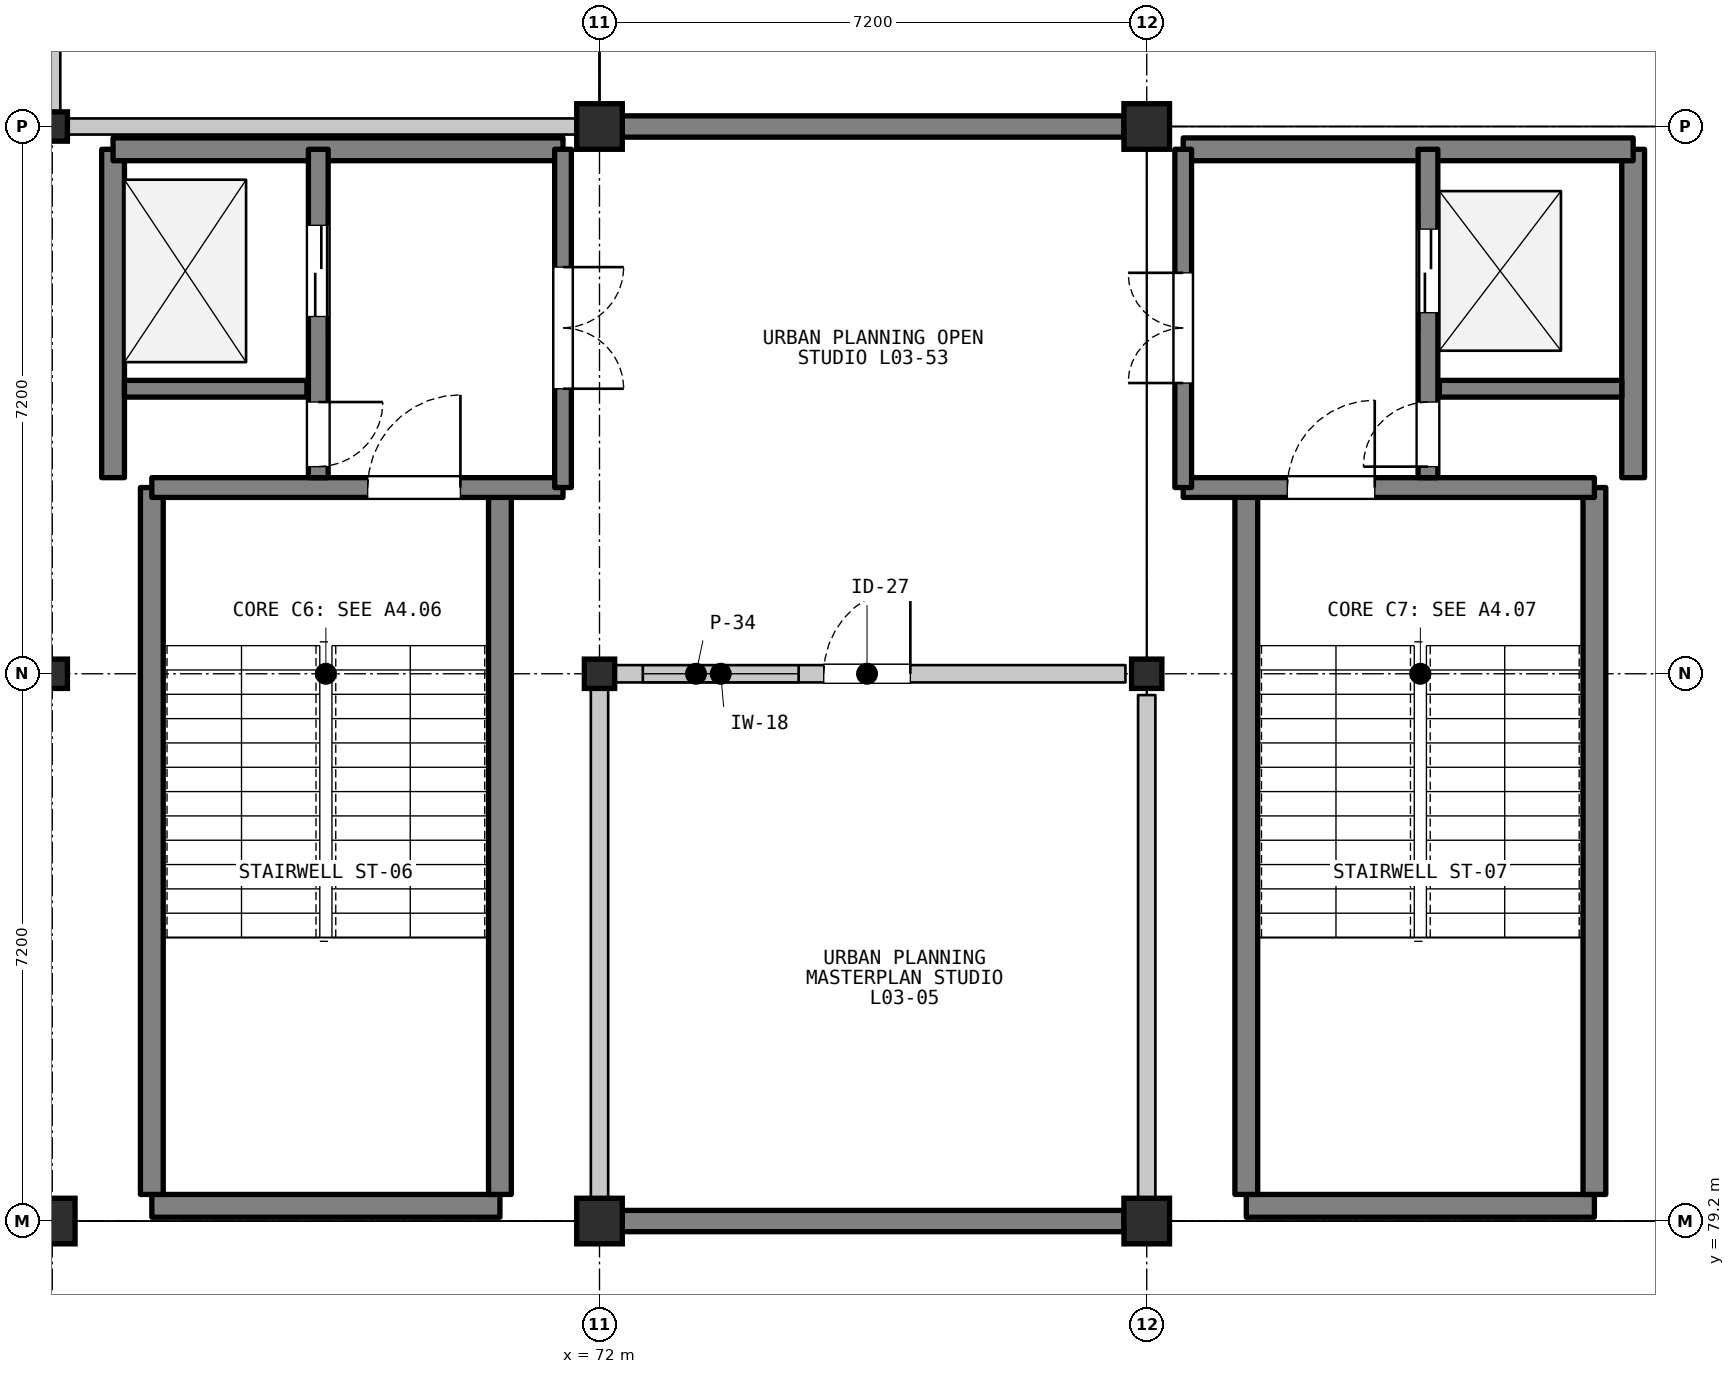
"""IFC4 building model, lengths in metres.
Left out: names, types, materials, properties, quantities, classifications, styles, units other than length and angle.
Written with IfcOpenShell. Run it as: python <this file> out.ifc"""

import sys

from ifc_helpers import new_model, si_unit, direction, frame, frame_2d, origin, origin_2d, place, context, subcontext, project, spatial, rectangle, i_section, extrude, element, fill, save


model = new_model("IFC4")
c1 = context("Model", 3, precision=1e-05, world=origin(), true_north=direction((0.0, 1.0)))
c2 = subcontext(c1, "Body", "Model", "MODEL_VIEW")
j1 = project(units=[si_unit("LENGTHUNIT", "METRE"), si_unit("PLANEANGLEUNIT", "RADIAN")], contexts=[c1])
p1 = place(None, origin())
s1 = spatial("IfcSite", under=j1, at=p1, CompositionType="ELEMENT")
p2 = place(p1, origin())
s2 = spatial("IfcBuilding", under=s1, at=p2, CompositionType="ELEMENT")
p3 = place(p2, frame((0.0, 0.0, 9.9)))
s3 = spatial("IfcBuildingStorey", under=s2, at=p3, CompositionType="ELEMENT", Elevation=9.9)
p4 = place(p3, frame((64.8, 79.2, 0.0), z_axis=(0.0, 0.0, 1.0), x_axis=(1.0, 0.0, 0.0)))
e1 = element("IfcColumn", 1, at=p4, inside=s3, PredefinedType="COLUMN", context=c2, shape_type="SweptSolid", body=[
    extrude(rectangle(XDim=0.6, YDim=0.6, at=origin_2d()), origin(), (0.0, 0.0, 1.0), 4.2),
])
for number, where, z_axis, x_axis in (
    (2, (64.8, 86.4, 0.0), (0.0, 0.0, 1.0), (1.0, 0.0, 0.0)),
    (3, (64.8, 93.6, 0.0), (0.0, 0.0, 1.0), (1.0, 0.0, 0.0)),
):
    element("IfcColumn", number, at=place(p3, frame(where, z_axis=z_axis, x_axis=x_axis)), inside=s3, PredefinedType="COLUMN", context=c2, shape_type="SweptSolid", body=[
        extrude(i_section(OverallWidth=0.399, OverallDepth=0.386, WebThickness=0.021, FlangeThickness=0.033, FilletRadius=0.015, at=origin_2d()), origin(), (0.0, 0.0, 1.0), 4.2),
    ])
p5 = place(p3, frame((72.0, 79.2, 0.0), z_axis=(0.0, 0.0, 1.0), x_axis=(1.0, 0.0, 0.0)))
e4 = element("IfcColumn", 4, at=p5, inside=s3, PredefinedType="COLUMN", context=c2, shape_type="SweptSolid", body=[
    extrude(rectangle(XDim=0.6, YDim=0.6, at=origin_2d()), origin(), (0.0, 0.0, 1.0), 4.2),
])
p6 = place(p3, frame((72.0, 86.4, 0.0), z_axis=(0.0, 0.0, 1.0), x_axis=(1.0, 0.0, 0.0)))
e5 = element("IfcColumn", 5, at=p6, inside=s3, PredefinedType="COLUMN", context=c2, shape_type="SweptSolid", body=[
    extrude(i_section(OverallWidth=0.399, OverallDepth=0.386, WebThickness=0.021, FlangeThickness=0.033, FilletRadius=0.015, at=origin_2d()), origin(), (0.0, 0.0, 1.0), 4.2),
])
for number, where, z_axis, x_axis in (
    (6, (72.0, 93.6, 0.0), (0.0, 0.0, 1.0), (1.0, 0.0, 0.0)),
    (7, (79.2, 79.2, 0.0), (0.0, 0.0, 1.0), (1.0, 0.0, 0.0)),
):
    element("IfcColumn", number, at=place(p3, frame(where, z_axis=z_axis, x_axis=x_axis)), inside=s3, PredefinedType="COLUMN", context=c2, shape_type="SweptSolid", body=[
        extrude(rectangle(XDim=0.6, YDim=0.6, at=origin_2d()), origin(), (0.0, 0.0, 1.0), 4.2),
    ])
p7 = place(p3, frame((79.2, 86.4, 0.0), z_axis=(0.0, 0.0, 1.0), x_axis=(1.0, 0.0, 0.0)))
e8 = element("IfcColumn", 8, at=p7, inside=s3, PredefinedType="COLUMN", context=c2, shape_type="SweptSolid", body=[
    extrude(i_section(OverallWidth=0.399, OverallDepth=0.386, WebThickness=0.021, FlangeThickness=0.033, FilletRadius=0.015, at=origin_2d()), origin(), (0.0, 0.0, 1.0), 4.2),
])
p8 = place(p3, frame((79.2, 93.6, 0.0), z_axis=(0.0, 0.0, 1.0), x_axis=(1.0, 0.0, 0.0)))
e9 = element("IfcColumn", 9, at=p8, inside=s3, PredefinedType="COLUMN", context=c2, shape_type="SweptSolid", body=[
    extrude(rectangle(XDim=0.6, YDim=0.6, at=origin_2d()), origin(), (0.0, 0.0, 1.0), 4.2),
])
for number, where, z_axis, x_axis in (
    (10, (78.9, 79.2, 0.0), (0.0, 0.0, 1.0), (-1.0, 0.0, 0.0)),
    (11, (72.3, 93.6, 0.0), (0.0, 0.0, 1.0), (1.0, 0.0, 0.0)),
):
    element("IfcWall", number, at=place(p3, frame(where, z_axis=z_axis, x_axis=x_axis)), inside=s3, PredefinedType="SOLIDWALL", context=c2, shape_type="SweptSolid", body=[
        extrude(rectangle(XDim=6.6, YDim=0.28, at=frame_2d((3.3, 0.0))), origin(), (0.0, 0.0, 1.0), 3.418),
    ])
p9 = place(p3, frame((66.11, 79.4, 0.0), z_axis=(0.0, 0.0, 1.0), x_axis=(1.0, 0.0, 0.0)))
e12 = element("IfcWall", 12, at=p9, inside=s3, PredefinedType="SHEAR", context=c2, shape_type="SweptSolid", body=[
    extrude(rectangle(XDim=4.58, YDim=0.3, at=frame_2d((2.29, 0.0))), origin(), (0.0, 0.0, 1.0), 4.02),
])
for number, where, z_axis, x_axis in (
    (13, (66.11, 79.55, 0.0), (0.0, 0.0, 1.0), (0.0, 1.0, 0.0)),
    (14, (70.69, 79.55, 0.0), (0.0, 0.0, 1.0), (0.0, 1.0, 0.0)),
):
    element("IfcWall", number, at=place(p3, frame(where, z_axis=z_axis, x_axis=x_axis)), inside=s3, PredefinedType="SHEAR", context=c2, shape_type="SweptSolid", body=[
        extrude(rectangle(XDim=9.3, YDim=0.3, at=frame_2d((4.65, 0.0))), origin(), (0.0, 0.0, 1.0), 4.02),
    ])
p10 = place(p3, frame((66.11, 88.85, 0.0), z_axis=(0.0, 0.0, 1.0), x_axis=(1.0, 0.0, 0.0)))
e15 = element("IfcWall", 15, at=p10, inside=s3, PredefinedType="SHEAR", context=c2, shape_type="SweptSolid", body=[
    extrude(rectangle(XDim=5.41, YDim=0.26, at=frame_2d((2.705, 0.0))), origin(), (0.0, 0.0, 1.0), 4.02),
])
p11 = place(p10, frame((2.84, 0.0, 0.0)))
e16 = element("IfcOpeningElement", 16, at=p11, cuts=e15, PredefinedType="OPENING", context=c2, shape_type="SweptSolid", body=[
    extrude(rectangle(XDim=1.22, YDim=2.15, at=frame_2d((0.61, 1.075))), frame((0.0, 0.14, 0.0), z_axis=(0.0, -1.0, 0.0), x_axis=(1.0, 0.0, 0.0)), (0.0, 0.0, 1.0), 0.28),
])
p12 = place(p3, frame((65.6, 88.98, 0.0), z_axis=(0.0, 0.0, 1.0), x_axis=(0.0, 1.0, 0.0)))
e17 = element("IfcWall", 17, at=p12, inside=s3, PredefinedType="SHEAR", context=c2, shape_type="SweptSolid", body=[
    extrude(rectangle(XDim=4.32, YDim=0.3, at=frame_2d((2.16, 0.0))), origin(), (0.0, 0.0, 1.0), 4.02),
])
p13 = place(p3, frame((65.6, 93.3, 0.0), z_axis=(0.0, 0.0, 1.0), x_axis=(1.0, 0.0, 0.0)))
e18 = element("IfcWall", 18, at=p13, inside=s3, PredefinedType="SHEAR", context=c2, shape_type="SweptSolid", body=[
    extrude(rectangle(XDim=5.92, YDim=0.3, at=frame_2d((2.96, 0.0))), origin(), (0.0, 0.0, 1.0), 4.02),
])
p14 = place(p3, frame((65.75, 90.15, 0.0), z_axis=(0.0, 0.0, 1.0), x_axis=(1.0, 0.0, 0.0)))
e19 = element("IfcWall", 19, at=p14, inside=s3, PredefinedType="SHEAR", context=c2, shape_type="SweptSolid", body=[
    extrude(rectangle(XDim=2.4, YDim=0.22, at=frame_2d((1.2, 0.0))), origin(), (0.0, 0.0, 1.0), 4.02),
])
p15 = place(p3, frame((68.3, 93.3, 0.0), z_axis=(0.0, 0.0, 1.0), x_axis=(0.0, -1.0, 0.0)))
e20 = element("IfcWall", 20, at=p15, inside=s3, PredefinedType="SHEAR", context=c2, shape_type="SweptSolid", body=[
    extrude(rectangle(XDim=4.32, YDim=0.26, at=frame_2d((2.16, 0.0))), origin(), (0.0, 0.0, 1.0), 4.02),
])
p16 = place(p15, frame((1.0, 0.0, 0.0)))
e21 = element("IfcOpeningElement", 21, at=p16, cuts=e20, PredefinedType="OPENING", context=c2, shape_type="SweptSolid", body=[
    extrude(rectangle(XDim=1.2, YDim=2.15, at=frame_2d((0.6, 1.075))), frame((0.0, 0.14, 0.0), z_axis=(0.0, -1.0, 0.0), x_axis=(1.0, 0.0, 0.0)), (0.0, 0.0, 1.0), 0.28),
])
p17 = place(p15, frame((3.325, 0.0, 0.0)))
e22 = element("IfcOpeningElement", 22, at=p17, cuts=e20, PredefinedType="OPENING", context=c2, shape_type="SweptSolid", body=[
    extrude(rectangle(XDim=0.85, YDim=2.05, at=frame_2d((0.425, 1.025))), frame((0.0, 0.14, 0.0), z_axis=(0.0, -1.0, 0.0), x_axis=(1.0, 0.0, 0.0)), (0.0, 0.0, 1.0), 0.28),
])
p18 = place(p3, frame((71.52, 93.3, 0.0), z_axis=(0.0, 0.0, 1.0), x_axis=(0.0, -1.0, 0.0)))
e23 = element("IfcWall", 23, at=p18, inside=s3, PredefinedType="SHEAR", context=c2, shape_type="SweptSolid", body=[
    extrude(rectangle(XDim=4.45, YDim=0.22, at=frame_2d((2.225, 0.0))), origin(), (0.0, 0.0, 1.0), 4.02),
])
p19 = place(p18, frame((1.55, 0.0, 0.0)))
e24 = element("IfcOpeningElement", 24, at=p19, cuts=e23, PredefinedType="OPENING", context=c2, shape_type="SweptSolid", body=[
    extrude(rectangle(XDim=1.6, YDim=2.2, at=frame_2d((0.8, 1.1))), frame((0.0, 0.12, 0.0), z_axis=(0.0, -1.0, 0.0), x_axis=(1.0, 0.0, 0.0)), (0.0, 0.0, 1.0), 0.24),
])
p20 = place(p3, frame((80.51, 79.4, 0.0), z_axis=(0.0, 0.0, 1.0), x_axis=(1.0, 0.0, 0.0)))
e25 = element("IfcWall", 25, at=p20, inside=s3, PredefinedType="SHEAR", context=c2, shape_type="SweptSolid", body=[
    extrude(rectangle(XDim=4.58, YDim=0.3, at=frame_2d((2.29, 0.0))), origin(), (0.0, 0.0, 1.0), 4.02),
])
for number, where, z_axis, x_axis in (
    (26, (80.51, 79.55, 0.0), (0.0, 0.0, 1.0), (0.0, 1.0, 0.0)),
    (27, (85.09, 79.55, 0.0), (0.0, 0.0, 1.0), (0.0, 1.0, 0.0)),
):
    element("IfcWall", number, at=place(p3, frame(where, z_axis=z_axis, x_axis=x_axis)), inside=s3, PredefinedType="SHEAR", context=c2, shape_type="SweptSolid", body=[
        extrude(rectangle(XDim=9.3, YDim=0.3, at=frame_2d((4.65, 0.0))), origin(), (0.0, 0.0, 1.0), 4.02),
    ])
p21 = place(p3, frame((79.68, 88.85, 0.0), z_axis=(0.0, 0.0, 1.0), x_axis=(1.0, 0.0, 0.0)))
e28 = element("IfcWall", 28, at=p21, inside=s3, PredefinedType="SHEAR", context=c2, shape_type="SweptSolid", body=[
    extrude(rectangle(XDim=5.41, YDim=0.26, at=frame_2d((2.705, 0.0))), origin(), (0.0, 0.0, 1.0), 4.02),
])
p22 = place(p21, frame((1.37, 0.0, 0.0)))
e29 = element("IfcOpeningElement", 29, at=p22, cuts=e28, PredefinedType="OPENING", context=c2, shape_type="SweptSolid", body=[
    extrude(rectangle(XDim=1.15, YDim=2.15, at=frame_2d((0.575, 1.075))), frame((0.0, 0.14, 0.0), z_axis=(0.0, -1.0, 0.0), x_axis=(1.0, 0.0, 0.0)), (0.0, 0.0, 1.0), 0.28),
])
p23 = place(p3, frame((85.6, 88.98, 0.0), z_axis=(0.0, 0.0, 1.0), x_axis=(0.0, 1.0, 0.0)))
e30 = element("IfcWall", 30, at=p23, inside=s3, PredefinedType="SHEAR", context=c2, shape_type="SweptSolid", body=[
    extrude(rectangle(XDim=4.32, YDim=0.3, at=frame_2d((2.16, 0.0))), origin(), (0.0, 0.0, 1.0), 4.02),
])
p24 = place(p3, frame((79.68, 93.3, 0.0), z_axis=(0.0, 0.0, 1.0), x_axis=(1.0, 0.0, 0.0)))
e31 = element("IfcWall", 31, at=p24, inside=s3, PredefinedType="SHEAR", context=c2, shape_type="SweptSolid", body=[
    extrude(rectangle(XDim=5.92, YDim=0.3, at=frame_2d((2.96, 0.0))), origin(), (0.0, 0.0, 1.0), 4.02),
])
p25 = place(p3, frame((83.05, 90.15, 0.0), z_axis=(0.0, 0.0, 1.0), x_axis=(1.0, 0.0, 0.0)))
e32 = element("IfcWall", 32, at=p25, inside=s3, PredefinedType="SHEAR", context=c2, shape_type="SweptSolid", body=[
    extrude(rectangle(XDim=2.4, YDim=0.22, at=frame_2d((1.2, 0.0))), origin(), (0.0, 0.0, 1.0), 4.02),
])
p26 = place(p3, frame((82.9, 88.98, 0.0), z_axis=(0.0, 0.0, 1.0), x_axis=(0.0, 1.0, 0.0)))
e33 = element("IfcWall", 33, at=p26, inside=s3, PredefinedType="SHEAR", context=c2, shape_type="SweptSolid", body=[
    extrude(rectangle(XDim=4.32, YDim=0.26, at=frame_2d((2.16, 0.0))), origin(), (0.0, 0.0, 1.0), 4.02),
])
p27 = place(p26, frame((2.17, 0.0, 0.0)))
e34 = element("IfcOpeningElement", 34, at=p27, cuts=e33, PredefinedType="OPENING", context=c2, shape_type="SweptSolid", body=[
    extrude(rectangle(XDim=1.1, YDim=2.15, at=frame_2d((0.55, 1.075))), frame((0.0, 0.14, 0.0), z_axis=(0.0, -1.0, 0.0), x_axis=(1.0, 0.0, 0.0)), (0.0, 0.0, 1.0), 0.28),
])
p28 = place(p26, frame((0.145, 0.0, 0.0)))
e35 = element("IfcOpeningElement", 35, at=p28, cuts=e33, PredefinedType="OPENING", context=c2, shape_type="SweptSolid", body=[
    extrude(rectangle(XDim=0.85, YDim=2.05, at=frame_2d((0.425, 1.025))), frame((0.0, 0.14, 0.0), z_axis=(0.0, -1.0, 0.0), x_axis=(1.0, 0.0, 0.0)), (0.0, 0.0, 1.0), 0.28),
])
p29 = place(p3, frame((79.68, 88.85, 0.0), z_axis=(0.0, 0.0, 1.0), x_axis=(0.0, 1.0, 0.0)))
e36 = element("IfcWall", 36, at=p29, inside=s3, PredefinedType="SHEAR", context=c2, shape_type="SweptSolid", body=[
    extrude(rectangle(XDim=4.45, YDim=0.22, at=frame_2d((2.225, 0.0))), origin(), (0.0, 0.0, 1.0), 4.02),
])
p30 = place(p29, frame((1.375, 0.0, 0.0)))
e37 = element("IfcOpeningElement", 37, at=p30, cuts=e36, PredefinedType="OPENING", context=c2, shape_type="SweptSolid", body=[
    extrude(rectangle(XDim=1.45, YDim=2.2, at=frame_2d((0.725, 1.1))), frame((0.0, 0.12, 0.0), z_axis=(0.0, -1.0, 0.0), x_axis=(1.0, 0.0, 0.0)), (0.0, 0.0, 1.0), 0.24),
])
for number, where, z_axis, x_axis in (
    (38, (71.88, 93.6, 0.0), (0.0, 0.0, 1.0), (-1.0, 0.0, 0.0)),
    (39, (64.8, 93.72, 0.0), (0.0, 0.0, 1.0), (0.0, 1.0, 0.0)),
):
    element("IfcWall", number, at=place(p3, frame(where, z_axis=z_axis, x_axis=x_axis)), inside=s3, PredefinedType="PARTITIONING", context=c2, shape_type="SweptSolid", body=[
        extrude(rectangle(XDim=6.96, YDim=0.212, at=frame_2d((3.48, 0.0))), origin(), (0.0, 0.0, 1.0), 3.408),
    ])
p31 = place(p3, frame((72.12, 86.4, 0.0), z_axis=(0.0, 0.0, 1.0), x_axis=(1.0, 0.0, 0.0)))
e40 = element("IfcWall", 40, at=p31, inside=s3, PredefinedType="PARTITIONING", context=c2, shape_type="SweptSolid", body=[
    extrude(rectangle(XDim=6.8, YDim=0.228, at=frame_2d((3.4, 0.0))), origin(), (0.0, 0.0, 1.0), 3.408),
])
p32 = place(p31, frame((2.83, 0.0, 0.0)))
e41 = element("IfcOpeningElement", 41, at=p32, cuts=e40, PredefinedType="OPENING", context=c2, shape_type="SweptSolid", body=[
    extrude(rectangle(XDim=1.14, YDim=2.18, at=frame_2d((0.57, 1.09))), frame((0.0, 0.124, 0.0), z_axis=(0.0, -1.0, 0.0), x_axis=(1.0, 0.0, 0.0)), (0.0, 0.0, 1.0), 0.248),
])
p33 = place(p31, frame((0.45, 0.0, 1.05)))
e42 = element("IfcOpeningElement", 42, at=p33, cuts=e40, PredefinedType="OPENING", context=c2, shape_type="SweptSolid", body=[
    extrude(rectangle(XDim=2.05, YDim=1.22, at=frame_2d((1.025, 0.61))), frame((0.0, 0.124, 0.0), z_axis=(0.0, -1.0, 0.0), x_axis=(1.0, 0.0, 0.0)), (0.0, 0.0, 1.0), 0.248),
])
p34 = place(p3, frame((72.0, 79.32, 0.0), z_axis=(0.0, 0.0, 1.0), x_axis=(0.0, 1.0, 0.0)))
e43 = element("IfcWall", 43, at=p34, inside=s3, PredefinedType="PARTITIONING", context=c2, shape_type="SweptSolid", body=[
    extrude(rectangle(XDim=6.96, YDim=0.228, at=frame_2d((3.48, 0.0))), origin(), (0.0, 0.0, 1.0), 3.408),
])
p35 = place(p3, frame((79.2, 86.12, 0.0), z_axis=(0.0, 0.0, 1.0), x_axis=(0.0, -1.0, 0.0)))
e44 = element("IfcWall", 44, at=p35, inside=s3, PredefinedType="PARTITIONING", context=c2, shape_type="SweptSolid", body=[
    extrude(rectangle(XDim=6.64, YDim=0.228, at=frame_2d((3.32, 0.0))), origin(), (0.0, 0.0, 1.0), 3.477),
])
p36 = place(p11, origin())
e45 = element("IfcDoor", 45, at=p36, inside=s3, OperationType="SINGLE_SWING_RIGHT", PredefinedType="DOOR", context=c2, shape_type="SweptSolid", body=[
    extrude(rectangle(XDim=1.22, YDim=2.15, at=frame_2d((0.61, 1.075))), frame((0.0, 0.025, 0.0), z_axis=(0.0, -1.0, 0.0), x_axis=(1.0, 0.0, 0.0)), (0.0, 0.0, 1.0), 0.05),
])
fill(e16, e45)
p37 = place(p16, origin())
e46 = element("IfcDoor", 46, at=p37, inside=s3, OperationType="DOUBLE_DOOR_SLIDING", PredefinedType="DOOR", context=c2, shape_type="SweptSolid", body=[
    extrude(rectangle(XDim=1.2, YDim=2.15, at=frame_2d((0.6, 1.075))), frame((0.0, 0.025, 0.0), z_axis=(0.0, -1.0, 0.0), x_axis=(1.0, 0.0, 0.0)), (0.0, 0.0, 1.0), 0.05),
])
fill(e21, e46)
p38 = place(p17, origin())
e47 = element("IfcDoor", 47, at=p38, inside=s3, OperationType="SINGLE_SWING_LEFT", PredefinedType="DOOR", context=c2, shape_type="SweptSolid", body=[
    extrude(rectangle(XDim=0.85, YDim=2.05, at=frame_2d((0.425, 1.025))), frame((0.0, 0.025, 0.0), z_axis=(0.0, -1.0, 0.0), x_axis=(1.0, 0.0, 0.0)), (0.0, 0.0, 1.0), 0.05),
])
fill(e22, e47)
p39 = place(p19, origin())
e48 = element("IfcDoor", 48, at=p39, inside=s3, OperationType="DOUBLE_DOOR_SINGLE_SWING", PredefinedType="DOOR", context=c2, shape_type="SweptSolid", body=[
    extrude(rectangle(XDim=1.6, YDim=2.2, at=frame_2d((0.8, 1.1))), frame((0.0, 0.025, 0.0), z_axis=(0.0, -1.0, 0.0), x_axis=(1.0, 0.0, 0.0)), (0.0, 0.0, 1.0), 0.05),
])
fill(e24, e48)
p40 = place(p22, origin())
e49 = element("IfcDoor", 49, at=p40, inside=s3, OperationType="SINGLE_SWING_RIGHT", PredefinedType="DOOR", context=c2, shape_type="SweptSolid", body=[
    extrude(rectangle(XDim=1.15, YDim=2.15, at=frame_2d((0.575, 1.075))), frame((0.0, 0.025, 0.0), z_axis=(0.0, -1.0, 0.0), x_axis=(1.0, 0.0, 0.0)), (0.0, 0.0, 1.0), 0.05),
])
fill(e29, e49)
p41 = place(p27, origin())
e50 = element("IfcDoor", 50, at=p41, inside=s3, OperationType="DOUBLE_DOOR_SLIDING", PredefinedType="DOOR", context=c2, shape_type="SweptSolid", body=[
    extrude(rectangle(XDim=1.1, YDim=2.15, at=frame_2d((0.55, 1.075))), frame((0.0, 0.025, 0.0), z_axis=(0.0, -1.0, 0.0), x_axis=(1.0, 0.0, 0.0)), (0.0, 0.0, 1.0), 0.05),
])
fill(e34, e50)
p42 = place(p28, origin())
e51 = element("IfcDoor", 51, at=p42, inside=s3, OperationType="SINGLE_SWING_LEFT", PredefinedType="DOOR", context=c2, shape_type="SweptSolid", body=[
    extrude(rectangle(XDim=0.85, YDim=2.05, at=frame_2d((0.425, 1.025))), frame((0.0, 0.025, 0.0), z_axis=(0.0, -1.0, 0.0), x_axis=(1.0, 0.0, 0.0)), (0.0, 0.0, 1.0), 0.05),
])
fill(e35, e51)
p43 = place(p30, origin())
e52 = element("IfcDoor", 52, at=p43, inside=s3, OperationType="DOUBLE_DOOR_SINGLE_SWING", PredefinedType="DOOR", context=c2, shape_type="SweptSolid", body=[
    extrude(rectangle(XDim=1.45, YDim=2.2, at=frame_2d((0.725, 1.1))), frame((0.0, 0.025, 0.0), z_axis=(0.0, -1.0, 0.0), x_axis=(1.0, 0.0, 0.0)), (0.0, 0.0, 1.0), 0.05),
])
fill(e37, e52)
p44 = place(p32, origin())
e53 = element("IfcDoor", 53, at=p44, inside=s3, OperationType="SINGLE_SWING_RIGHT", PredefinedType="DOOR", context=c2, shape_type="SweptSolid", body=[
    extrude(rectangle(XDim=1.14, YDim=2.18, at=frame_2d((0.57, 1.09))), frame((0.0, 0.025, 0.0), z_axis=(0.0, -1.0, 0.0), x_axis=(1.0, 0.0, 0.0)), (0.0, 0.0, 1.0), 0.05),
])
fill(e41, e53)
p45 = place(p33, origin())
e54 = element("IfcWindow", 54, at=p45, inside=s3, PartitioningType="SINGLE_PANEL", PredefinedType="WINDOW", context=c2, shape_type="SweptSolid", body=[
    extrude(rectangle(XDim=2.05, YDim=1.22, at=frame_2d((1.025, 0.61))), frame((0.0, 0.03, 0.0), z_axis=(0.0, -1.0, 0.0), x_axis=(1.0, 0.0, 0.0)), (0.0, 0.0, 1.0), 0.06),
])
fill(e42, e54)
save(model, sys.argv[1])
